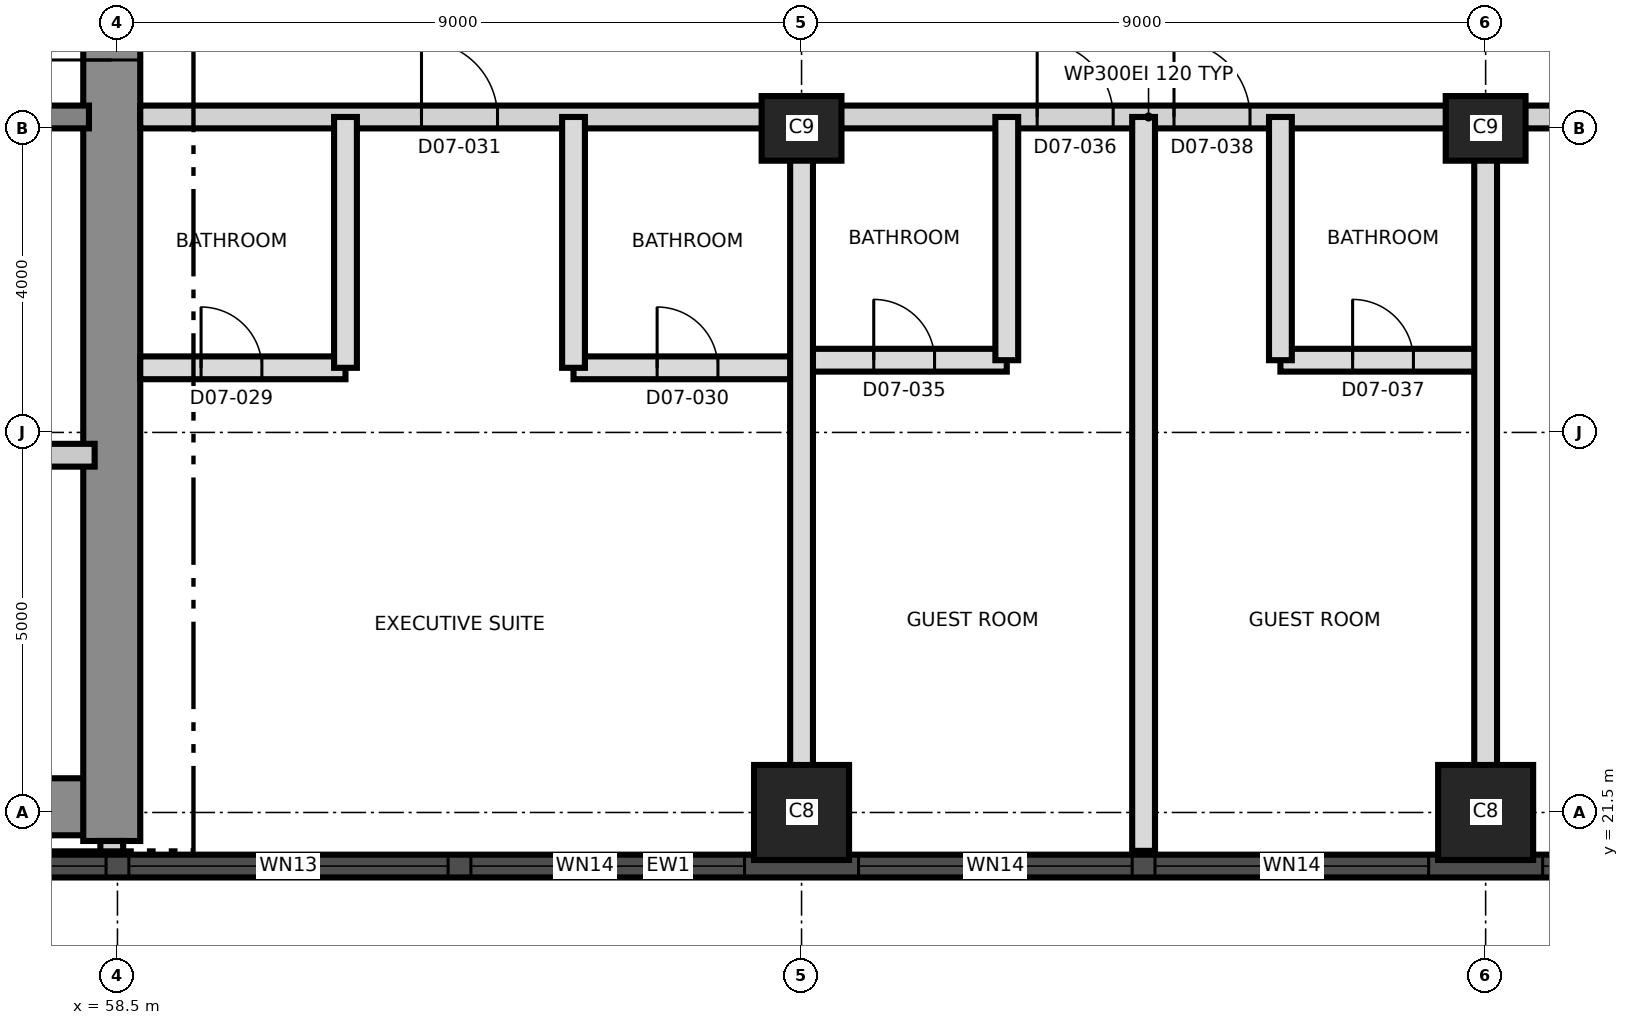
"""IFC4 building model, lengths in metres.
Left out: names, types, materials, properties, quantities, classifications, styles, units other than length and angle.
Written with IfcOpenShell. Run it as: python <this file> out.ifc"""

import sys

from ifc_helpers import new_model, si_unit, direction, frame, frame_2d, origin, origin_2d, place, context, subcontext, project, spatial, rectangle, extrude, element, fill, save


model = new_model("IFC4")
c1 = context("Model", 3, precision=1e-05, world=origin(), true_north=direction((0.0, 1.0)))
c2 = subcontext(c1, "Body", "Model", "MODEL_VIEW")
j1 = project(units=[si_unit("LENGTHUNIT", "METRE"), si_unit("PLANEANGLEUNIT", "RADIAN")], contexts=[c1])
p1 = place(None, origin())
s1 = spatial("IfcSite", under=j1, at=p1, CompositionType="ELEMENT")
p2 = place(p1, origin())
s2 = spatial("IfcBuilding", under=s1, at=p2, CompositionType="ELEMENT")
p3 = place(p2, frame((0.0, 0.0, 87.1)))
s3 = spatial("IfcBuildingStorey", under=s2, at=p3, CompositionType="ELEMENT", Elevation=87.1)
p4 = place(p3, frame((31.125, 21.575, 0.0), z_axis=(0.0, 0.0, 1.0), x_axis=(1.0, 0.0, 0.0)))
e1 = element("IfcWall", 1, at=p4, inside=s3, PredefinedType="SHEAR", context=c2, shape_type="SweptSolid", body=[
    extrude(rectangle(XDim=27.0, YDim=0.75, at=frame_2d((13.5, 0.0))), origin(), (0.0, 0.0, 1.0), 3.7),
])
p5 = place(p3, frame((58.425, 21.125, 0.0), z_axis=(0.0, 0.0, 1.0), x_axis=(0.0, 1.0, 0.0)))
e2 = element("IfcWall", 2, at=p5, inside=s3, PredefinedType="SHEAR", context=c2, shape_type="SweptSolid", body=[
    extrude(rectangle(XDim=18.75, YDim=0.75, at=frame_2d((9.375, 0.0))), origin(), (0.0, 0.0, 1.0), 3.7),
])
p6 = place(p5, frame((10.275, 0.0, 0.0)))
e3 = element("IfcOpeningElement", 3, at=p6, cuts=e2, PredefinedType="OPENING", context=c2, shape_type="SweptSolid", body=[
    extrude(rectangle(XDim=1.2, YDim=2.1, at=frame_2d((0.6, 1.05))), frame((0.0, 0.385, 0.0), z_axis=(0.0, -1.0, 0.0), x_axis=(1.0, 0.0, 0.0)), (0.0, 0.0, 1.0), 0.77),
])
p7 = place(p3, frame((31.875, 30.65, 0.0), z_axis=(0.0, 0.0, 1.0), x_axis=(1.0, 0.0, 0.0)))
e4 = element("IfcWall", 4, at=p7, inside=s3, PredefinedType="SHEAR", context=c2, shape_type="SweptSolid", body=[
    extrude(rectangle(XDim=26.25, YDim=0.3, at=frame_2d((13.125, 0.0))), origin(), (0.0, 0.0, 1.0), 3.7),
])
p8 = place(p7, frame((24.625, 0.0, 0.0)))
e5 = element("IfcOpeningElement", 5, at=p8, cuts=e4, PredefinedType="OPENING", context=c2, shape_type="SweptSolid", body=[
    extrude(rectangle(XDim=1.0, YDim=2.1, at=frame_2d((0.5, 1.05))), frame((0.0, 0.16, 0.0), z_axis=(0.0, -1.0, 0.0), x_axis=(1.0, 0.0, 0.0)), (0.0, 0.0, 1.0), 0.32),
])
p9 = place(p7, frame((11.425, 0.0, 0.0)))
e6 = element("IfcOpeningElement", 6, at=p9, cuts=e4, PredefinedType="OPENING", context=c2, shape_type="SweptSolid", body=[
    extrude(rectangle(XDim=1.0, YDim=2.1, at=frame_2d((0.5, 1.05))), frame((0.0, 0.16, 0.0), z_axis=(0.0, -1.0, 0.0), x_axis=(1.0, 0.0, 0.0)), (0.0, 0.0, 1.0), 0.32),
])
for number, where, z_axis, x_axis in (
    (7, (67.5, 21.5, 0.0), (0.0, 0.0, 1.0), (1.0, 0.0, 0.0)),
    (8, (76.5, 21.5, 0.0), (0.0, 0.0, 1.0), (1.0, 0.0, 0.0)),
):
    element("IfcColumn", number, at=place(p3, frame(where, z_axis=z_axis, x_axis=x_axis)), inside=s3, PredefinedType="COLUMN", context=c2, shape_type="SweptSolid", body=[
        extrude(rectangle(XDim=1.25, YDim=1.25, at=origin_2d()), origin(), (0.0, 0.0, 1.0), 3.7),
    ])
for number, where, z_axis, x_axis in (
    (9, (67.5, 30.5, 0.0), (0.0, 0.0, 1.0), (1.0, 0.0, 0.0)),
    (10, (76.5, 30.5, 0.0), (0.0, 0.0, 1.0), (1.0, 0.0, 0.0)),
):
    element("IfcColumn", number, at=place(p3, frame(where, z_axis=z_axis, x_axis=x_axis)), inside=s3, PredefinedType="COLUMN", context=c2, shape_type="SweptSolid", body=[
        extrude(rectangle(XDim=1.05, YDim=0.85, at=origin_2d()), origin(), (0.0, 0.0, 1.0), 3.7),
    ])
p10 = place(p3, frame((44.011, 20.795, 0.0), z_axis=(0.0, 0.0, 1.0), x_axis=(1.0, 0.0, 0.0)))
e11 = element("IfcWall", 11, at=p10, inside=s3, PredefinedType="SOLIDWALL", context=c2, shape_type="SweptSolid", body=[
    extrude(rectangle(XDim=43.476, YDim=0.3, at=frame_2d((21.738, 0.0))), origin(), (0.0, 0.0, 1.0), 3.4),
])
p11 = place(p10, frame((1.845, 0.0, 0.3)))
e12 = element("IfcOpeningElement", 12, at=p11, cuts=e11, PredefinedType="OPENING", context=c2, shape_type="SweptSolid", body=[
    extrude(rectangle(XDim=1.8, YDim=2.4, at=frame_2d((0.9, 1.2))), frame((0.0, 0.16, 0.0), z_axis=(0.0, -1.0, 0.0), x_axis=(1.0, 0.0, 0.0)), (0.0, 0.0, 1.0), 0.32),
])
p12 = place(p10, frame((5.639, 0.0, 0.9)))
e13 = element("IfcOpeningElement", 13, at=p12, cuts=e11, PredefinedType="OPENING", context=c2, shape_type="SweptSolid", body=[
    extrude(rectangle(XDim=4.2, YDim=1.7, at=frame_2d((2.1, 0.85))), frame((0.0, 0.16, 0.0), z_axis=(0.0, -1.0, 0.0), x_axis=(1.0, 0.0, 0.0)), (0.0, 0.0, 1.0), 0.32),
])
p13 = place(p10, frame((10.139, 0.0, 0.9)))
e14 = element("IfcOpeningElement", 14, at=p13, cuts=e11, PredefinedType="OPENING", context=c2, shape_type="SweptSolid", body=[
    extrude(rectangle(XDim=4.2, YDim=1.7, at=frame_2d((2.1, 0.85))), frame((0.0, 0.16, 0.0), z_axis=(0.0, -1.0, 0.0), x_axis=(1.0, 0.0, 0.0)), (0.0, 0.0, 1.0), 0.32),
])
p14 = place(p10, frame((14.639, 0.0, 0.9)))
e15 = element("IfcOpeningElement", 15, at=p14, cuts=e11, PredefinedType="OPENING", context=c2, shape_type="SweptSolid", body=[
    extrude(rectangle(XDim=4.2, YDim=1.7, at=frame_2d((2.1, 0.85))), frame((0.0, 0.16, 0.0), z_axis=(0.0, -1.0, 0.0), x_axis=(1.0, 0.0, 0.0)), (0.0, 0.0, 1.0), 0.32),
])
p15 = place(p10, frame((19.139, 0.0, 0.9)))
e16 = element("IfcOpeningElement", 16, at=p15, cuts=e11, PredefinedType="OPENING", context=c2, shape_type="SweptSolid", body=[
    extrude(rectangle(XDim=3.6, YDim=1.7, at=frame_2d((1.8, 0.85))), frame((0.0, 0.16, 0.0), z_axis=(0.0, -1.0, 0.0), x_axis=(1.0, 0.0, 0.0)), (0.0, 0.0, 1.0), 0.32),
])
p16 = place(p10, frame((24.239, 0.0, 0.9)))
e17 = element("IfcOpeningElement", 17, at=p16, cuts=e11, PredefinedType="OPENING", context=c2, shape_type="SweptSolid", body=[
    extrude(rectangle(XDim=3.6, YDim=1.7, at=frame_2d((1.8, 0.85))), frame((0.0, 0.16, 0.0), z_axis=(0.0, -1.0, 0.0), x_axis=(1.0, 0.0, 0.0)), (0.0, 0.0, 1.0), 0.32),
])
p17 = place(p10, frame((28.139, 0.0, 0.9)))
e18 = element("IfcOpeningElement", 18, at=p17, cuts=e11, PredefinedType="OPENING", context=c2, shape_type="SweptSolid", body=[
    extrude(rectangle(XDim=3.6, YDim=1.7, at=frame_2d((1.8, 0.85))), frame((0.0, 0.16, 0.0), z_axis=(0.0, -1.0, 0.0), x_axis=(1.0, 0.0, 0.0)), (0.0, 0.0, 1.0), 0.32),
])
p18 = place(p10, frame((33.239, 0.0, 0.9)))
e19 = element("IfcOpeningElement", 19, at=p18, cuts=e11, PredefinedType="OPENING", context=c2, shape_type="SweptSolid", body=[
    extrude(rectangle(XDim=3.6, YDim=1.7, at=frame_2d((1.8, 0.85))), frame((0.0, 0.16, 0.0), z_axis=(0.0, -1.0, 0.0), x_axis=(1.0, 0.0, 0.0)), (0.0, 0.0, 1.0), 0.32),
])
p19 = place(p10, frame((37.139, 0.0, 0.9)))
e20 = element("IfcOpeningElement", 20, at=p19, cuts=e11, PredefinedType="OPENING", context=c2, shape_type="SweptSolid", body=[
    extrude(rectangle(XDim=3.6, YDim=1.7, at=frame_2d((1.8, 0.85))), frame((0.0, 0.16, 0.0), z_axis=(0.0, -1.0, 0.0), x_axis=(1.0, 0.0, 0.0)), (0.0, 0.0, 1.0), 0.32),
])
p20 = place(p3, frame((55.8, 26.2, 0.0), z_axis=(0.0, 0.0, 1.0), x_axis=(1.0, 0.0, 0.0)))
e21 = element("IfcWall", 21, at=p20, inside=s3, PredefinedType="PARTITIONING", context=c2, shape_type="SweptSolid", body=[
    extrude(rectangle(XDim=2.4, YDim=0.3, at=frame_2d((1.2, 0.0))), origin(), (0.0, 0.0, 1.0), 3.4),
])
p21 = place(p20, frame((0.75, 0.0, 0.0)))
e22 = element("IfcOpeningElement", 22, at=p21, cuts=e21, PredefinedType="OPENING", context=c2, shape_type="SweptSolid", body=[
    extrude(rectangle(XDim=0.9, YDim=2.1, at=frame_2d((0.45, 1.05))), frame((0.0, 0.16, 0.0), z_axis=(0.0, -1.0, 0.0), x_axis=(1.0, 0.0, 0.0)), (0.0, 0.0, 1.0), 0.32),
])
p22 = place(p3, frame((58.8, 27.35, 0.0), z_axis=(0.0, 0.0, 1.0), x_axis=(1.0, 0.0, 0.0)))
e23 = element("IfcWall", 23, at=p22, inside=s3, PredefinedType="PARTITIONING", context=c2, shape_type="SweptSolid", body=[
    extrude(rectangle(XDim=2.7, YDim=0.3, at=frame_2d((1.35, 0.0))), origin(), (0.0, 0.0, 1.0), 3.4),
])
p23 = place(p22, frame((0.8, 0.0, 0.0)))
e24 = element("IfcOpeningElement", 24, at=p23, cuts=e23, PredefinedType="OPENING", context=c2, shape_type="SweptSolid", body=[
    extrude(rectangle(XDim=0.8, YDim=2.1, at=frame_2d((0.4, 1.05))), frame((0.0, 0.16, 0.0), z_axis=(0.0, -1.0, 0.0), x_axis=(1.0, 0.0, 0.0)), (0.0, 0.0, 1.0), 0.32),
])
p24 = place(p3, frame((64.5, 27.35, 0.0), z_axis=(0.0, 0.0, 1.0), x_axis=(1.0, 0.0, 0.0)))
e25 = element("IfcWall", 25, at=p24, inside=s3, PredefinedType="PARTITIONING", context=c2, shape_type="SweptSolid", body=[
    extrude(rectangle(XDim=3.0, YDim=0.3, at=frame_2d((1.5, 0.0))), origin(), (0.0, 0.0, 1.0), 3.4),
])
p25 = place(p24, frame((1.1, 0.0, 0.0)))
e26 = element("IfcOpeningElement", 26, at=p25, cuts=e25, PredefinedType="OPENING", context=c2, shape_type="SweptSolid", body=[
    extrude(rectangle(XDim=0.8, YDim=2.1, at=frame_2d((0.4, 1.05))), frame((0.0, 0.16, 0.0), z_axis=(0.0, -1.0, 0.0), x_axis=(1.0, 0.0, 0.0)), (0.0, 0.0, 1.0), 0.32),
])
p26 = place(p3, frame((67.5, 27.45, 0.0), z_axis=(0.0, 0.0, 1.0), x_axis=(1.0, 0.0, 0.0)))
e27 = element("IfcWall", 27, at=p26, inside=s3, PredefinedType="PARTITIONING", context=c2, shape_type="SweptSolid", body=[
    extrude(rectangle(XDim=2.7, YDim=0.3, at=frame_2d((1.35, 0.0))), origin(), (0.0, 0.0, 1.0), 3.4),
])
p27 = place(p26, frame((0.95, 0.0, 0.0)))
e28 = element("IfcOpeningElement", 28, at=p27, cuts=e27, PredefinedType="OPENING", context=c2, shape_type="SweptSolid", body=[
    extrude(rectangle(XDim=0.8, YDim=2.1, at=frame_2d((0.4, 1.05))), frame((0.0, 0.16, 0.0), z_axis=(0.0, -1.0, 0.0), x_axis=(1.0, 0.0, 0.0)), (0.0, 0.0, 1.0), 0.32),
])
p28 = place(p3, frame((73.8, 27.45, 0.0), z_axis=(0.0, 0.0, 1.0), x_axis=(1.0, 0.0, 0.0)))
e29 = element("IfcWall", 29, at=p28, inside=s3, PredefinedType="PARTITIONING", context=c2, shape_type="SweptSolid", body=[
    extrude(rectangle(XDim=2.7, YDim=0.3, at=frame_2d((1.35, 0.0))), origin(), (0.0, 0.0, 1.0), 3.4),
])
p29 = place(p28, frame((0.95, 0.0, 0.0)))
e30 = element("IfcOpeningElement", 30, at=p29, cuts=e29, PredefinedType="OPENING", context=c2, shape_type="SweptSolid", body=[
    extrude(rectangle(XDim=0.8, YDim=2.1, at=frame_2d((0.4, 1.05))), frame((0.0, 0.16, 0.0), z_axis=(0.0, -1.0, 0.0), x_axis=(1.0, 0.0, 0.0)), (0.0, 0.0, 1.0), 0.32),
])
p30 = place(p3, frame((58.8, 30.65, 0.0), z_axis=(0.0, 0.0, 1.0), x_axis=(1.0, 0.0, 0.0)))
e31 = element("IfcWall", 31, at=p30, inside=s3, PredefinedType="PARTITIONING", context=c2, shape_type="SweptSolid", body=[
    extrude(rectangle(XDim=26.53, YDim=0.3, at=frame_2d((13.265, 0.0))), origin(), (0.0, 0.0, 1.0), 3.4),
])
p31 = place(p30, frame((3.7, 0.0, 0.0)))
e32 = element("IfcOpeningElement", 32, at=p31, cuts=e31, PredefinedType="OPENING", context=c2, shape_type="SweptSolid", body=[
    extrude(rectangle(XDim=1.0, YDim=2.4, at=frame_2d((0.5, 1.2))), frame((0.0, 0.16, 0.0), z_axis=(0.0, -1.0, 0.0), x_axis=(1.0, 0.0, 0.0)), (0.0, 0.0, 1.0), 0.32),
])
p32 = place(p30, frame((11.8, 0.0, 0.0)))
e33 = element("IfcOpeningElement", 33, at=p32, cuts=e31, PredefinedType="OPENING", context=c2, shape_type="SweptSolid", body=[
    extrude(rectangle(XDim=1.0, YDim=2.1, at=frame_2d((0.5, 1.05))), frame((0.0, 0.16, 0.0), z_axis=(0.0, -1.0, 0.0), x_axis=(1.0, 0.0, 0.0)), (0.0, 0.0, 1.0), 0.32),
])
p33 = place(p30, frame((13.6, 0.0, 0.0)))
e34 = element("IfcOpeningElement", 34, at=p33, cuts=e31, PredefinedType="OPENING", context=c2, shape_type="SweptSolid", body=[
    extrude(rectangle(XDim=1.0, YDim=2.1, at=frame_2d((0.5, 1.05))), frame((0.0, 0.16, 0.0), z_axis=(0.0, -1.0, 0.0), x_axis=(1.0, 0.0, 0.0)), (0.0, 0.0, 1.0), 0.32),
])
p34 = place(p30, frame((18.85, 0.0, 0.0)))
e35 = element("IfcOpeningElement", 35, at=p34, cuts=e31, PredefinedType="OPENING", context=c2, shape_type="SweptSolid", body=[
    extrude(rectangle(XDim=1.0, YDim=2.1, at=frame_2d((0.5, 1.05))), frame((0.0, 0.16, 0.0), z_axis=(0.0, -1.0, 0.0), x_axis=(1.0, 0.0, 0.0)), (0.0, 0.0, 1.0), 0.32),
])
p35 = place(p30, frame((24.7, 0.0, 0.0)))
e36 = element("IfcOpeningElement", 36, at=p35, cuts=e31, PredefinedType="OPENING", context=c2, shape_type="SweptSolid", body=[
    extrude(rectangle(XDim=1.0, YDim=2.1, at=frame_2d((0.5, 1.05))), frame((0.0, 0.16, 0.0), z_axis=(0.0, -1.0, 0.0), x_axis=(1.0, 0.0, 0.0)), (0.0, 0.0, 1.0), 0.32),
])
for number, where, z_axis, x_axis in (
    (37, (61.5, 27.35, 0.0), (0.0, 0.0, 1.0), (0.0, 1.0, 0.0)),
    (38, (64.5, 27.35, 0.0), (0.0, 0.0, 1.0), (0.0, 1.0, 0.0)),
):
    element("IfcWall", number, at=place(p3, frame(where, z_axis=z_axis, x_axis=x_axis)), inside=s3, PredefinedType="PARTITIONING", context=c2, shape_type="SweptSolid", body=[
        extrude(rectangle(XDim=3.3, YDim=0.3, at=frame_2d((1.65, 0.0))), origin(), (0.0, 0.0, 1.0), 3.4),
    ])
p36 = place(p3, frame((67.5, 20.995, 0.0), z_axis=(0.0, 0.0, 1.0), x_axis=(0.0, 1.0, 0.0)))
e39 = element("IfcWall", 39, at=p36, inside=s3, PredefinedType="PARTITIONING", context=c2, shape_type="SweptSolid", body=[
    extrude(rectangle(XDim=9.655, YDim=0.3, at=frame_2d((4.827, 0.0))), origin(), (0.0, 0.0, 1.0), 3.4),
])
p37 = place(p3, frame((70.2, 27.45, 0.0), z_axis=(0.0, 0.0, 1.0), x_axis=(0.0, 1.0, 0.0)))
e40 = element("IfcWall", 40, at=p37, inside=s3, PredefinedType="PARTITIONING", context=c2, shape_type="SweptSolid", body=[
    extrude(rectangle(XDim=3.2, YDim=0.3, at=frame_2d((1.6, 0.0))), origin(), (0.0, 0.0, 1.0), 3.4),
])
p38 = place(p3, frame((72.0, 20.995, 0.0), z_axis=(0.0, 0.0, 1.0), x_axis=(0.0, 1.0, 0.0)))
e41 = element("IfcWall", 41, at=p38, inside=s3, PredefinedType="PARTITIONING", context=c2, shape_type="SweptSolid", body=[
    extrude(rectangle(XDim=9.655, YDim=0.3, at=frame_2d((4.827, 0.0))), origin(), (0.0, 0.0, 1.0), 3.4),
])
p39 = place(p3, frame((73.8, 27.45, 0.0), z_axis=(0.0, 0.0, 1.0), x_axis=(0.0, 1.0, 0.0)))
e42 = element("IfcWall", 42, at=p39, inside=s3, PredefinedType="PARTITIONING", context=c2, shape_type="SweptSolid", body=[
    extrude(rectangle(XDim=3.2, YDim=0.3, at=frame_2d((1.6, 0.0))), origin(), (0.0, 0.0, 1.0), 3.4),
])
p40 = place(p3, frame((76.5, 20.995, 0.0), z_axis=(0.0, 0.0, 1.0), x_axis=(0.0, 1.0, 0.0)))
e43 = element("IfcWall", 43, at=p40, inside=s3, PredefinedType="PARTITIONING", context=c2, shape_type="SweptSolid", body=[
    extrude(rectangle(XDim=9.655, YDim=0.3, at=frame_2d((4.827, 0.0))), origin(), (0.0, 0.0, 1.0), 3.4),
])
p41 = place(p3, frame((58.425, 21.125, 0.0), z_axis=(0.0, 0.0, 1.0), x_axis=(0.0, -1.0, 0.0)))
e44 = element("IfcWall", 44, at=p41, inside=s3, PredefinedType="PARTITIONING", context=c2, shape_type="SweptSolid", body=[
    extrude(rectangle(XDim=0.17, YDim=0.3, at=frame_2d((0.085, 0.0))), origin(), (0.0, 0.0, 1.0), 3.4),
])
p42 = place(p13, origin())
e45 = element("IfcWindow", 45, at=p42, inside=s3, PartitioningType="SINGLE_PANEL", PredefinedType="WINDOW", context=c2, shape_type="SweptSolid", body=[
    extrude(rectangle(XDim=4.2, YDim=1.7, at=frame_2d((2.1, 0.85))), frame((0.0, 0.03, 0.0), z_axis=(0.0, -1.0, 0.0), x_axis=(1.0, 0.0, 0.0)), (0.0, 0.0, 1.0), 0.06),
])
fill(e14, e45)
p43 = place(p14, origin())
e46 = element("IfcWindow", 46, at=p43, inside=s3, PartitioningType="SINGLE_PANEL", PredefinedType="WINDOW", context=c2, shape_type="SweptSolid", body=[
    extrude(rectangle(XDim=4.2, YDim=1.7, at=frame_2d((2.1, 0.85))), frame((0.0, 0.03, 0.0), z_axis=(0.0, -1.0, 0.0), x_axis=(1.0, 0.0, 0.0)), (0.0, 0.0, 1.0), 0.06),
])
fill(e15, e46)
p44 = place(p15, origin())
e47 = element("IfcWindow", 47, at=p44, inside=s3, PartitioningType="SINGLE_PANEL", PredefinedType="WINDOW", context=c2, shape_type="SweptSolid", body=[
    extrude(rectangle(XDim=3.6, YDim=1.7, at=frame_2d((1.8, 0.85))), frame((0.0, 0.03, 0.0), z_axis=(0.0, -1.0, 0.0), x_axis=(1.0, 0.0, 0.0)), (0.0, 0.0, 1.0), 0.06),
])
fill(e16, e47)
p45 = place(p16, origin())
e48 = element("IfcWindow", 48, at=p45, inside=s3, PartitioningType="SINGLE_PANEL", PredefinedType="WINDOW", context=c2, shape_type="SweptSolid", body=[
    extrude(rectangle(XDim=3.6, YDim=1.7, at=frame_2d((1.8, 0.85))), frame((0.0, 0.03, 0.0), z_axis=(0.0, -1.0, 0.0), x_axis=(1.0, 0.0, 0.0)), (0.0, 0.0, 1.0), 0.06),
])
fill(e17, e48)
p46 = place(p17, origin())
e49 = element("IfcWindow", 49, at=p46, inside=s3, PartitioningType="SINGLE_PANEL", PredefinedType="WINDOW", context=c2, shape_type="SweptSolid", body=[
    extrude(rectangle(XDim=3.6, YDim=1.7, at=frame_2d((1.8, 0.85))), frame((0.0, 0.03, 0.0), z_axis=(0.0, -1.0, 0.0), x_axis=(1.0, 0.0, 0.0)), (0.0, 0.0, 1.0), 0.06),
])
fill(e18, e49)
p47 = place(p18, origin())
e50 = element("IfcWindow", 50, at=p47, inside=s3, PartitioningType="SINGLE_PANEL", PredefinedType="WINDOW", context=c2, shape_type="SweptSolid", body=[
    extrude(rectangle(XDim=3.6, YDim=1.7, at=frame_2d((1.8, 0.85))), frame((0.0, 0.03, 0.0), z_axis=(0.0, -1.0, 0.0), x_axis=(1.0, 0.0, 0.0)), (0.0, 0.0, 1.0), 0.06),
])
fill(e19, e50)
p48 = place(p6, origin())
e51 = element("IfcDoor", 51, at=p48, inside=s3, OperationType="SINGLE_SWING_LEFT", PredefinedType="DOOR", context=c2, shape_type="SweptSolid", body=[
    extrude(rectangle(XDim=1.2, YDim=2.1, at=frame_2d((0.6, 1.05))), frame((0.0, 0.025, 0.0), z_axis=(0.0, -1.0, 0.0), x_axis=(1.0, 0.0, 0.0)), (0.0, 0.0, 1.0), 0.05),
])
fill(e3, e51)
p49 = place(p23, origin())
e52 = element("IfcDoor", 52, at=p49, inside=s3, OperationType="SINGLE_SWING_LEFT", PredefinedType="DOOR", context=c2, shape_type="SweptSolid", body=[
    extrude(rectangle(XDim=0.8, YDim=2.1, at=frame_2d((0.4, 1.05))), frame((0.0, 0.025, 0.0), z_axis=(0.0, -1.0, 0.0), x_axis=(1.0, 0.0, 0.0)), (0.0, 0.0, 1.0), 0.05),
])
fill(e24, e52)
p50 = place(p25, origin())
e53 = element("IfcDoor", 53, at=p50, inside=s3, OperationType="SINGLE_SWING_RIGHT", PredefinedType="DOOR", context=c2, shape_type="SweptSolid", body=[
    extrude(rectangle(XDim=0.8, YDim=2.1, at=frame_2d((0.4, 1.05))), frame((0.0, 0.025, 0.0), z_axis=(0.0, -1.0, 0.0), x_axis=(1.0, 0.0, 0.0)), (0.0, 0.0, 1.0), 0.05),
])
fill(e26, e53)
p51 = place(p31, origin())
e54 = element("IfcDoor", 54, at=p51, inside=s3, OperationType="SINGLE_SWING_LEFT", PredefinedType="DOOR", context=c2, shape_type="SweptSolid", body=[
    extrude(rectangle(XDim=1.0, YDim=2.4, at=frame_2d((0.5, 1.2))), frame((0.0, 0.025, 0.0), z_axis=(0.0, -1.0, 0.0), x_axis=(1.0, 0.0, 0.0)), (0.0, 0.0, 1.0), 0.05),
])
fill(e32, e54)
p52 = place(p27, origin())
e55 = element("IfcDoor", 55, at=p52, inside=s3, OperationType="SINGLE_SWING_LEFT", PredefinedType="DOOR", context=c2, shape_type="SweptSolid", body=[
    extrude(rectangle(XDim=0.8, YDim=2.1, at=frame_2d((0.4, 1.05))), frame((0.0, 0.025, 0.0), z_axis=(0.0, -1.0, 0.0), x_axis=(1.0, 0.0, 0.0)), (0.0, 0.0, 1.0), 0.05),
])
fill(e28, e55)
p53 = place(p32, origin())
e56 = element("IfcDoor", 56, at=p53, inside=s3, OperationType="SINGLE_SWING_LEFT", PredefinedType="DOOR", context=c2, shape_type="SweptSolid", body=[
    extrude(rectangle(XDim=1.0, YDim=2.1, at=frame_2d((0.5, 1.05))), frame((0.0, 0.025, 0.0), z_axis=(0.0, -1.0, 0.0), x_axis=(1.0, 0.0, 0.0)), (0.0, 0.0, 1.0), 0.05),
])
fill(e33, e56)
p54 = place(p29, origin())
e57 = element("IfcDoor", 57, at=p54, inside=s3, OperationType="SINGLE_SWING_LEFT", PredefinedType="DOOR", context=c2, shape_type="SweptSolid", body=[
    extrude(rectangle(XDim=0.8, YDim=2.1, at=frame_2d((0.4, 1.05))), frame((0.0, 0.025, 0.0), z_axis=(0.0, -1.0, 0.0), x_axis=(1.0, 0.0, 0.0)), (0.0, 0.0, 1.0), 0.05),
])
fill(e30, e57)
p55 = place(p33, origin())
e58 = element("IfcDoor", 58, at=p55, inside=s3, OperationType="SINGLE_SWING_RIGHT", PredefinedType="DOOR", context=c2, shape_type="SweptSolid", body=[
    extrude(rectangle(XDim=1.0, YDim=2.1, at=frame_2d((0.5, 1.05))), frame((0.0, 0.025, 0.0), z_axis=(0.0, -1.0, 0.0), x_axis=(1.0, 0.0, 0.0)), (0.0, 0.0, 1.0), 0.05),
])
fill(e34, e58)
save(model, sys.argv[1])
